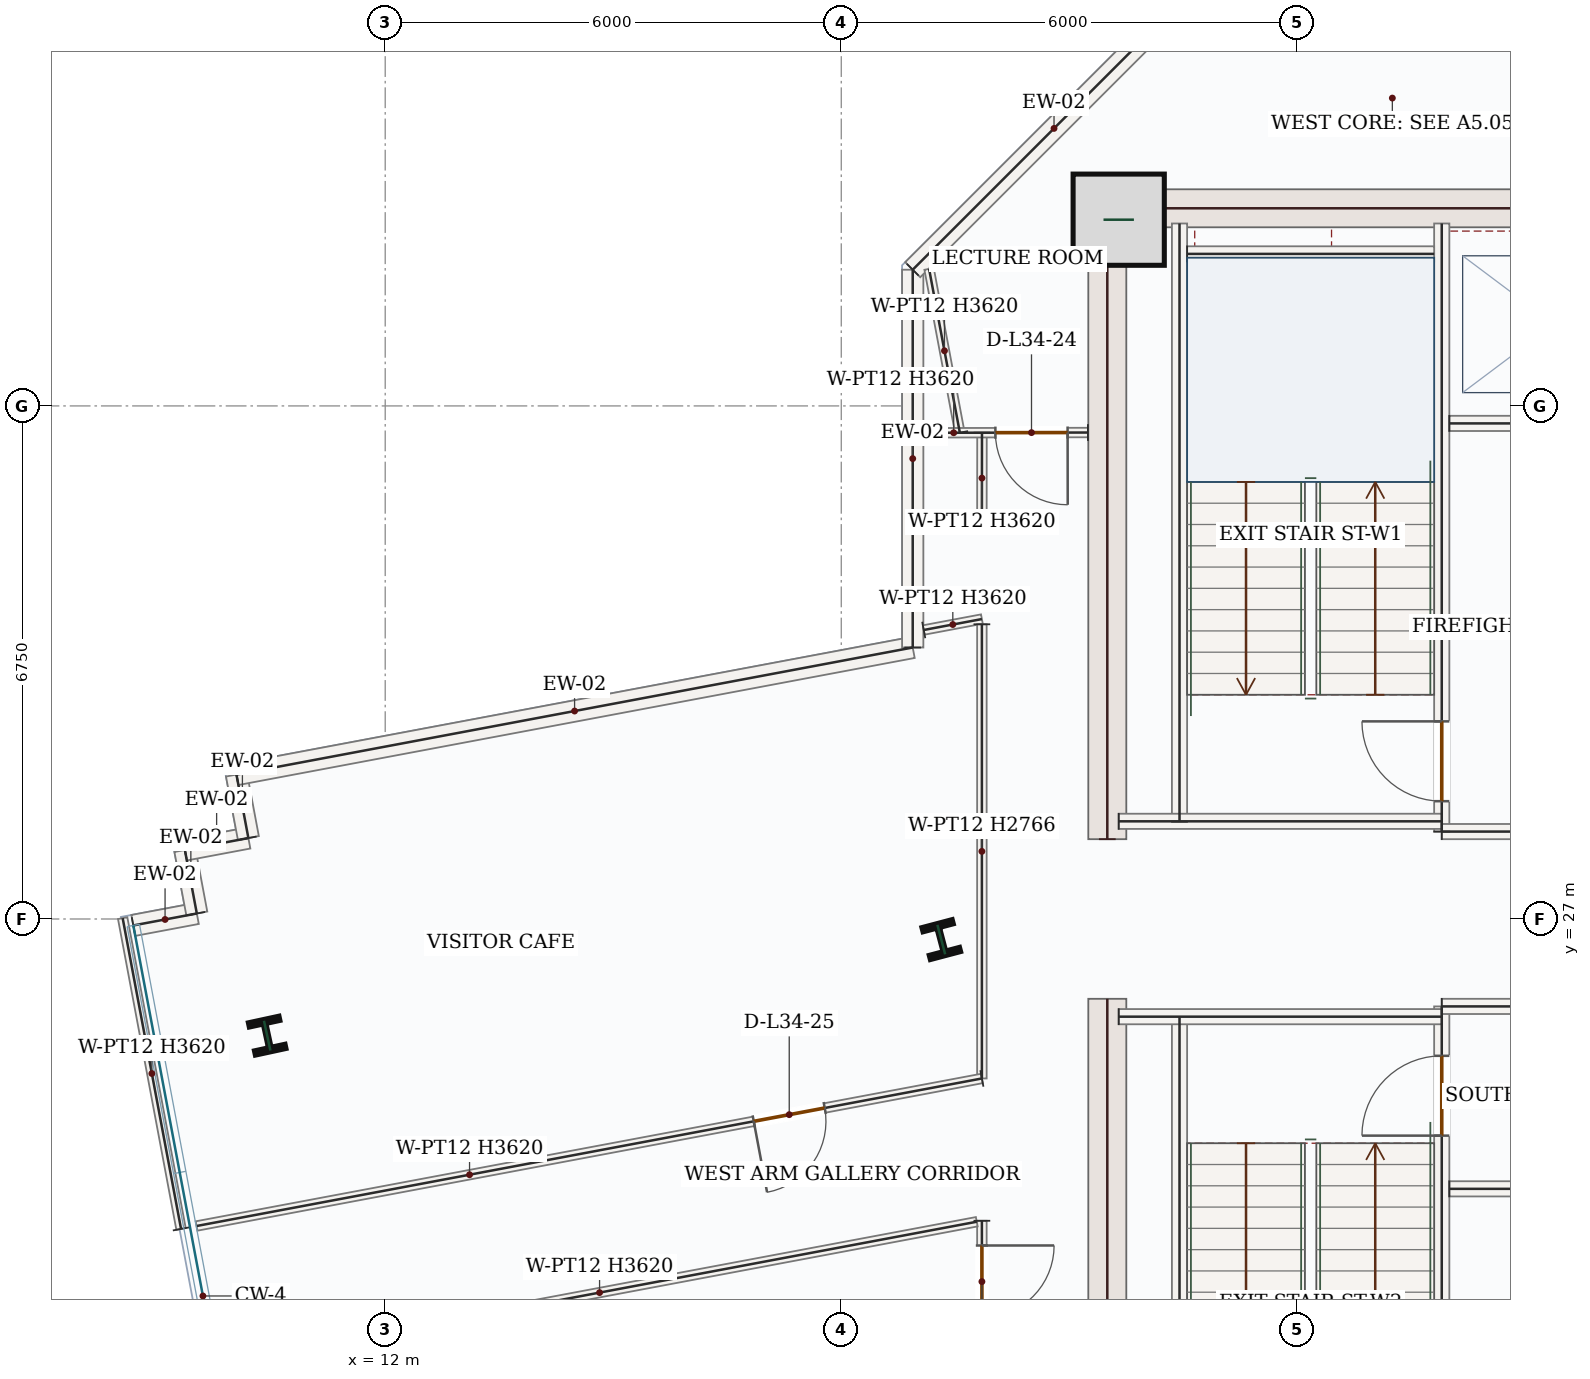
"""IFC4 building model, lengths in metres.
Left out: names, types, materials, properties, quantities, classifications, styles, units other than length and angle.
Written with IfcOpenShell. Run it as: python <this file> out.ifc"""

import sys

from ifc_helpers import new_model, si_unit, direction, frame, frame_2d, origin, origin_2d, place, context, subcontext, project, spatial, rectangle, i_section, extrude, source, transform, mapped, element, fill, save


model = new_model("IFC4")
c1 = context("Model", 3, precision=1e-05, world=origin(), true_north=direction((0.0, 1.0)))
c2 = subcontext(c1, "Body", "Model", "MODEL_VIEW")
j1 = project(units=[si_unit("LENGTHUNIT", "METRE"), si_unit("PLANEANGLEUNIT", "RADIAN")], contexts=[c1])
p1 = place(None, origin())
s1 = spatial("IfcSite", under=j1, at=p1, CompositionType="ELEMENT")
p2 = place(p1, origin())
s2 = spatial("IfcBuilding", under=s1, at=p2, CompositionType="ELEMENT")
p3 = place(p2, frame((0.0, 0.0, 151.2)))
s3 = spatial("IfcBuildingStorey", under=s2, at=p3, CompositionType="ELEMENT", Elevation=151.2)
m1 = source(origin(), c2, "Body", "SweptSolid", [
    extrude(rectangle(XDim=8.55, YDim=0.5, at=frame_2d((4.275, 0.0))), origin(), (0.0, 0.0, 1.0), 3.62),
])
for number, where, z_axis, x_axis in (
    (1, (21.5, 17.4, 0.0), (0.0, 0.0, 1.0), (0.0, 1.0, 0.0)),
    (2, (21.5, 28.05, 0.0), (0.0, 0.0, 1.0), (0.0, 1.0, 0.0)),
):
    element("IfcWall", number, at=place(p3, frame(where, z_axis=z_axis, x_axis=x_axis)), inside=s3, PredefinedType="SHEAR", context=c2, shape_type="MappedRepresentation", body=[
        mapped(m1, transform((0.0, 0.0, 0.0), x_axis=(1.0, 0.0, 0.0), y_axis=(0.0, 1.0, 0.0), z_axis=(0.0, 0.0, 1.0), scale=1.0)),
    ])
m2 = source(origin(), c2, "Body", "SweptSolid", [
    extrude(rectangle(XDim=7.0, YDim=0.5, at=frame_2d((3.5, 0.0))), origin(), (0.0, 0.0, 1.0), 3.62),
])
p4 = place(p3, frame((21.75, 36.35, 0.0), z_axis=(0.0, 0.0, 1.0), x_axis=(1.0, 0.0, 0.0)))
e3 = element("IfcWall", 3, at=p4, inside=s3, PredefinedType="SHEAR", context=c2, shape_type="MappedRepresentation", body=[
    mapped(m2, transform((0.0, 0.0, 0.0), x_axis=(1.0, 0.0, 0.0), y_axis=(0.0, 1.0, 0.0), z_axis=(0.0, 0.0, 1.0), scale=1.0)),
])
m3 = source(origin(), c2, "Body", "SweptSolid", [
    extrude(rectangle(XDim=1.2, YDim=1.2, at=origin_2d()), origin(), (0.0, 0.0, 1.0), 3.9),
])
p5 = place(p3, frame((21.65, 36.2, 0.0), z_axis=(0.0, 0.0, 1.0), x_axis=(1.0, 0.0, 0.0)))
e4 = element("IfcColumn", 4, at=p5, inside=s3, PredefinedType="COLUMN", context=c2, shape_type="MappedRepresentation", body=[
    mapped(m3, transform((0.0, 0.0, 0.0), x_axis=(1.0, 0.0, 0.0), y_axis=(0.0, 1.0, 0.0), z_axis=(0.0, 0.0, 1.0), scale=1.0)),
])
m4 = source(origin(), c2, "Body", "SweptSolid", [
    extrude(i_section(OverallWidth=0.412, OverallDepth=0.435, WebThickness=0.036, FlangeThickness=0.057, FilletRadius=0.018, at=origin_2d()), origin(), (0.0, 0.0, 1.0), 3.9),
])
for number, where, z_axis, x_axis in (
    (5, (19.316, 26.729, 0.0), (0.0, 0.0, 1.0), (0.967, 0.255, 0.0)),
    (6, (10.447, 25.465, 0.0), (0.0, 0.0, 1.0), (0.977, 0.211, 0.0)),
):
    element("IfcColumn", number, at=place(p3, frame(where, z_axis=z_axis, x_axis=x_axis)), inside=s3, PredefinedType="COLUMN", context=c2, shape_type="MappedRepresentation", body=[
        mapped(m4, transform((0.0, 0.0, 0.0), x_axis=(1.0, 0.0, 0.0), y_axis=(0.0, 1.0, 0.0), z_axis=(0.0, 0.0, 1.0), scale=1.0)),
    ])
m5 = source(origin(), c2, "Body", "SweptSolid", [
    extrude(rectangle(XDim=0.85, YDim=0.28, at=frame_2d((0.425, 0.0))), origin(), (0.0, 0.0, 1.0), 3.62),
])
for number, where, z_axis, x_axis in (
    (7, (8.686, 26.915, 0.0), (0.0, 0.0, 1.0), (0.983, 0.185, 0.0)),
    (8, (9.521, 27.072, 0.0), (0.0, 0.0, 1.0), (-0.185, 0.983, 0.0)),
):
    element("IfcWall", number, at=place(p3, frame(where, z_axis=z_axis, x_axis=x_axis)), inside=s3, PredefinedType="SOLIDWALL", context=c2, shape_type="MappedRepresentation", body=[
        mapped(m5, transform((0.0, 0.0, 0.0), x_axis=(1.0, 0.0, 0.0), y_axis=(0.0, 1.0, 0.0), z_axis=(0.0, 0.0, 1.0), scale=1.0)),
    ])
m6 = source(origin(), c2, "Body", "SweptSolid", [
    extrude(rectangle(XDim=0.85, YDim=0.28, at=frame_2d((0.425, 0.0))), origin(), (0.0, 0.0, 1.0), 3.62),
])
p6 = place(p3, frame((9.365, 27.908, 0.0), z_axis=(0.0, 0.0, 1.0), x_axis=(0.982790785128, 0.184722149909, 0.0)))
e9 = element("IfcWall", 9, at=p6, inside=s3, PredefinedType="SOLIDWALL", context=c2, shape_type="MappedRepresentation", body=[
    mapped(m6, transform((0.0, 0.0, 0.0), x_axis=(1.0, 0.0, 0.0), y_axis=(0.0, 1.0, 0.0), z_axis=(0.0, 0.0, 1.0), scale=1.0)),
])
p7 = place(p3, frame((10.2, 28.065, 0.0), z_axis=(0.0, 0.0, 1.0), x_axis=(-0.184392582027, 0.982852672425, 0.0)))
e10 = element("IfcWall", 10, at=p7, inside=s3, PredefinedType="SOLIDWALL", context=c2, shape_type="MappedRepresentation", body=[
    mapped(m5, transform((0.0, 0.0, 0.0), x_axis=(1.0, 0.0, 0.0), y_axis=(0.0, 1.0, 0.0), z_axis=(0.0, 0.0, 1.0), scale=1.0)),
])
m7 = source(origin(), c2, "Body", "SweptSolid", [
    extrude(rectangle(XDim=9.052, YDim=0.28, at=frame_2d((4.526, 0.0))), origin(), (0.0, 0.0, 1.0), 3.62),
])
p8 = place(p3, frame((10.043, 28.9, 0.0), z_axis=(0.0, 0.0, 1.0), x_axis=(0.982808012228, 0.184630471755, 0.0)))
e11 = element("IfcWall", 11, at=p8, inside=s3, PredefinedType="SOLIDWALL", context=c2, shape_type="MappedRepresentation", body=[
    mapped(m7, transform((0.0, 0.0, 0.0), x_axis=(1.0, 0.0, 0.0), y_axis=(0.0, 1.0, 0.0), z_axis=(0.0, 0.0, 1.0), scale=1.0)),
])
m8 = source(origin(), c2, "Body", "SweptSolid", [
    extrude(rectangle(XDim=4.97, YDim=0.28, at=frame_2d((2.485, 0.0))), origin(), (0.0, 0.0, 1.0), 3.62),
])
p9 = place(p3, frame((18.94, 30.572, 0.0), z_axis=(0.0, 0.0, 1.0), x_axis=(0.0, 1.0, 0.0)))
e12 = element("IfcWall", 12, at=p9, inside=s3, PredefinedType="SOLIDWALL", context=c2, shape_type="MappedRepresentation", body=[
    mapped(m8, transform((0.0, 0.0, 0.0), x_axis=(1.0, 0.0, 0.0), y_axis=(0.0, 1.0, 0.0), z_axis=(0.0, 0.0, 1.0), scale=1.0)),
])
m9 = source(origin(), c2, "Body", "SweptSolid", [
    extrude(rectangle(XDim=5.258, YDim=0.28, at=frame_2d((2.629, 0.0))), origin(), (0.0, 0.0, 1.0), 3.62),
])
p10 = place(p3, frame((18.94, 35.542, 0.0), z_axis=(0.0, 0.0, 1.0), x_axis=(0.707106781187, 0.707106781187, 0.0)))
e13 = element("IfcWall", 13, at=p10, inside=s3, PredefinedType="SOLIDWALL", context=c2, shape_type="MappedRepresentation", body=[
    mapped(m9, transform((0.0, 0.0, 0.0), x_axis=(1.0, 0.0, 0.0), y_axis=(0.0, 1.0, 0.0), z_axis=(0.0, 0.0, 1.0), scale=1.0)),
])
m10 = source(origin(), c2, "Body", "SweptSolid", [
    extrude(rectangle(XDim=7.87, YDim=0.2, at=frame_2d((3.935, 0.0))), origin(), (0.0, 0.0, 1.0), 3.62),
])
for number, where, z_axis, x_axis in (
    (14, (22.45, 17.85, 0.0), (0.0, 0.0, 1.0), (0.0, 1.0, 0.0)),
    (15, (22.45, 28.28, 0.0), (0.0, 0.0, 1.0), (0.0, 1.0, 0.0)),
):
    element("IfcWall", number, at=place(p3, frame(where, z_axis=z_axis, x_axis=x_axis)), inside=s3, PredefinedType="SOLIDWALL", context=c2, shape_type="MappedRepresentation", body=[
        mapped(m10, transform((0.0, 0.0, 0.0), x_axis=(1.0, 0.0, 0.0), y_axis=(0.0, 1.0, 0.0), z_axis=(0.0, 0.0, 1.0), scale=1.0)),
    ])
p11 = place(p3, frame((25.9, 17.85, 0.0), z_axis=(0.0, 0.0, 1.0), x_axis=(0.0, 1.0, 0.0)))
e16 = element("IfcWall", 16, at=p11, inside=s3, PredefinedType="SOLIDWALL", context=c2, shape_type="SweptSolid", body=[
    extrude(rectangle(XDim=8.0, YDim=0.2, at=frame_2d((4.0, 0.0))), origin(), (0.0, 0.0, 1.0), 3.62),
])
p12 = place(p11, frame((6.3, 0.0, 0.0)))
e17 = element("IfcOpeningElement", 17, at=p12, cuts=e16, PredefinedType="OPENING", context=c2, shape_type="SweptSolid", body=[
    extrude(rectangle(XDim=1.05, YDim=2.15, at=frame_2d((0.525, 1.075))), frame((0.0, 0.11, 0.0), z_axis=(0.0, -1.0, 0.0), x_axis=(1.0, 0.0, 0.0)), (0.0, 0.0, 1.0), 0.22),
])
p13 = place(p3, frame((25.9, 28.15, 0.0), z_axis=(0.0, 0.0, 1.0), x_axis=(0.0, 1.0, 0.0)))
e18 = element("IfcWall", 18, at=p13, inside=s3, PredefinedType="SOLIDWALL", context=c2, shape_type="SweptSolid", body=[
    extrude(rectangle(XDim=8.0, YDim=0.2, at=frame_2d((4.0, 0.0))), origin(), (0.0, 0.0, 1.0), 3.62),
])
p14 = place(p13, frame((0.4, 0.0, 0.0)))
e19 = element("IfcOpeningElement", 19, at=p14, cuts=e18, PredefinedType="OPENING", context=c2, shape_type="SweptSolid", body=[
    extrude(rectangle(XDim=1.05, YDim=2.15, at=frame_2d((0.525, 1.075))), frame((0.0, 0.11, 0.0), z_axis=(0.0, -1.0, 0.0), x_axis=(1.0, 0.0, 0.0)), (0.0, 0.0, 1.0), 0.22),
])
m11 = source(origin(), c2, "Body", "SweptSolid", [
    extrude(rectangle(XDim=4.25, YDim=0.2, at=frame_2d((2.125, 0.0))), origin(), (0.0, 0.0, 1.0), 3.62),
])
p15 = place(p3, frame((21.65, 25.715, 0.0), z_axis=(0.0, 0.0, 1.0), x_axis=(1.0, 0.0, 0.0)))
e20 = element("IfcWall", 20, at=p15, inside=s3, PredefinedType="SOLIDWALL", context=c2, shape_type="MappedRepresentation", body=[
    mapped(m11, transform((0.0, 0.0, 0.0), x_axis=(1.0, 0.0, 0.0), y_axis=(0.0, 1.0, 0.0), z_axis=(0.0, 0.0, 1.0), scale=1.0)),
])
m12 = source(origin(), c2, "Body", "SweptSolid", [
    extrude(rectangle(XDim=3.0, YDim=0.2, at=frame_2d((1.5, 0.0))), origin(), (0.0, 0.0, 1.0), 3.62),
])
p16 = place(p3, frame((25.9, 25.85, 0.0), z_axis=(0.0, 0.0, 1.0), x_axis=(1.0, 0.0, 0.0)))
e21 = element("IfcWall", 21, at=p16, inside=s3, PredefinedType="SOLIDWALL", context=c2, shape_type="MappedRepresentation", body=[
    mapped(m12, transform((0.0, 0.0, 0.0), x_axis=(1.0, 0.0, 0.0), y_axis=(0.0, 1.0, 0.0), z_axis=(0.0, 0.0, 1.0), scale=1.0)),
])
p17 = place(p3, frame((21.65, 28.285, 0.0), z_axis=(0.0, 0.0, 1.0), x_axis=(1.0, 0.0, 0.0)))
e22 = element("IfcWall", 22, at=p17, inside=s3, PredefinedType="SOLIDWALL", context=c2, shape_type="MappedRepresentation", body=[
    mapped(m11, transform((0.0, 0.0, 0.0), x_axis=(1.0, 0.0, 0.0), y_axis=(0.0, 1.0, 0.0), z_axis=(0.0, 0.0, 1.0), scale=1.0)),
])
p18 = place(p3, frame((25.9, 28.15, 0.0), z_axis=(0.0, 0.0, 1.0), x_axis=(1.0, 0.0, 0.0)))
e23 = element("IfcWall", 23, at=p18, inside=s3, PredefinedType="SOLIDWALL", context=c2, shape_type="MappedRepresentation", body=[
    mapped(m12, transform((0.0, 0.0, 0.0), x_axis=(1.0, 0.0, 0.0), y_axis=(0.0, 1.0, 0.0), z_axis=(0.0, 0.0, 1.0), scale=1.0)),
])
m13 = source(origin(), c2, "Body", "SweptSolid", [
    extrude(rectangle(XDim=3.25, YDim=0.2, at=frame_2d((1.625, 0.0))), origin(), (0.0, 0.0, 1.0), 3.62),
])
p19 = place(p3, frame((22.55, 35.75, 0.0), z_axis=(0.0, 0.0, 1.0), x_axis=(1.0, 0.0, 0.0)))
e24 = element("IfcWall", 24, at=p19, inside=s3, PredefinedType="SOLIDWALL", context=c2, shape_type="MappedRepresentation", body=[
    mapped(m13, transform((0.0, 0.0, 0.0), x_axis=(1.0, 0.0, 0.0), y_axis=(0.0, 1.0, 0.0), z_axis=(0.0, 0.0, 1.0), scale=1.0)),
])
p20 = place(p3, frame((26.0, 33.52, 0.0), z_axis=(0.0, 0.0, 1.0), x_axis=(1.0, 0.0, 0.0)))
e25 = element("IfcWall", 25, at=p20, inside=s3, PredefinedType="SOLIDWALL", context=c2, shape_type="SweptSolid", body=[
    extrude(rectangle(XDim=2.75, YDim=0.2, at=frame_2d((1.375, 0.0))), origin(), (0.0, 0.0, 1.0), 3.62),
])
p21 = place(p20, frame((0.82, 0.0, 0.0)))
e26 = element("IfcOpeningElement", 26, at=p21, cuts=e25, PredefinedType="OPENING", context=c2, shape_type="SweptSolid", body=[
    extrude(rectangle(XDim=1.1, YDim=2.15, at=frame_2d((0.55, 1.075))), frame((0.0, 0.11, 0.0), z_axis=(0.0, -1.0, 0.0), x_axis=(1.0, 0.0, 0.0)), (0.0, 0.0, 1.0), 0.22),
])
m14 = source(origin(), c2, "Body", "SweptSolid", [
    extrude(rectangle(XDim=2.75, YDim=0.2, at=frame_2d((1.375, 0.0))), origin(), (0.0, 0.0, 1.0), 3.62),
])
p22 = place(p3, frame((26.0, 23.45, 0.0), z_axis=(0.0, 0.0, 1.0), x_axis=(1.0, 0.0, 0.0)))
e27 = element("IfcWall", 27, at=p22, inside=s3, PredefinedType="SOLIDWALL", context=c2, shape_type="MappedRepresentation", body=[
    mapped(m14, transform((0.0, 0.0, 0.0), x_axis=(1.0, 0.0, 0.0), y_axis=(0.0, 1.0, 0.0), z_axis=(0.0, 0.0, 1.0), scale=1.0)),
])
m15 = source(origin(), c2, "Body", "SweptSolid", [
    extrude(rectangle(XDim=1.195, YDim=0.125, at=frame_2d((0.597, 0.0))), origin(), (0.0, 0.0, 1.0), 3.62),
])
p23 = place(p3, frame((19.851, 33.398, 0.0), z_axis=(0.0, 0.0, 1.0), x_axis=(-0.001021867441, -0.999999477893, 0.0)))
e28 = element("IfcWall", 28, at=p23, inside=s3, PredefinedType="PARTITIONING", context=c2, shape_type="MappedRepresentation", body=[
    mapped(m15, transform((0.0, 0.0, 0.0), x_axis=(1.0, 0.0, 0.0), y_axis=(0.0, 1.0, 0.0), z_axis=(0.0, 0.0, 1.0), scale=1.0)),
])
m16 = source(origin(), c2, "Body", "SweptSolid", [
    extrude(rectangle(XDim=2.192, YDim=0.125, at=frame_2d((1.096, 0.0))), origin(), (0.0, 0.0, 1.0), 3.62),
])
p24 = place(p3, frame((19.56, 33.398, 0.0), z_axis=(0.0, 0.0, 1.0), x_axis=(-0.184665106031, 0.982801505196, 0.0)))
e29 = element("IfcWall", 29, at=p24, inside=s3, PredefinedType="PARTITIONING", context=c2, shape_type="MappedRepresentation", body=[
    mapped(m16, transform((0.0, 0.0, 0.0), x_axis=(1.0, 0.0, 0.0), y_axis=(0.0, 1.0, 0.0), z_axis=(0.0, 0.0, 1.0), scale=1.0)),
])
p25 = place(p3, frame((21.245, 33.4, 0.0), z_axis=(0.0, 0.0, 1.0), x_axis=(-0.99999875384, -0.001578708001, 0.0)))
e30 = element("IfcWall", 30, at=p25, inside=s3, PredefinedType="PARTITIONING", context=c2, shape_type="SweptSolid", body=[
    extrude(rectangle(XDim=2.165, YDim=0.125, at=frame_2d((1.083, 0.0))), origin(), (0.0, 0.0, 1.0), 3.62),
])
p26 = place(p25, frame((0.267, 0.0, 0.0)))
e31 = element("IfcOpeningElement", 31, at=p26, cuts=e30, PredefinedType="OPENING", context=c2, shape_type="SweptSolid", body=[
    extrude(rectangle(XDim=0.95, YDim=2.15, at=frame_2d((0.475, 1.075))), frame((0.0, 0.073, 0.0), z_axis=(0.0, -1.0, 0.0), x_axis=(1.0, 0.0, 0.0)), (0.0, 0.0, 1.0), 0.145),
])
m17 = source(origin(), c2, "Body", "SweptSolid", [
    extrude(rectangle(XDim=4.16, YDim=0.125, at=frame_2d((2.08, 0.0))), origin(), (0.0, 0.0, 1.0), 3.62),
])
p27 = place(p3, frame((9.314, 22.923, 0.0), z_axis=(0.0, 0.0, 1.0), x_axis=(-0.184635785614, 0.982807013951, 0.0)))
e32 = element("IfcWall", 32, at=p27, inside=s3, PredefinedType="PARTITIONING", context=c2, shape_type="MappedRepresentation", body=[
    mapped(m17, transform((0.0, 0.0, 0.0), x_axis=(1.0, 0.0, 0.0), y_axis=(0.0, 1.0, 0.0), z_axis=(0.0, 0.0, 1.0), scale=1.0)),
])
m18 = source(origin(), c2, "Body", "SweptSolid", [
    extrude(rectangle(XDim=0.779, YDim=0.125, at=frame_2d((0.389, 0.0))), origin(), (0.0, 0.0, 1.0), 3.62),
])
p28 = place(p3, frame((19.085, 30.802, 0.0), z_axis=(0.0, 0.0, 1.0), x_axis=(0.982850878619, 0.184402143149, 0.0)))
e33 = element("IfcWall", 33, at=p28, inside=s3, PredefinedType="PARTITIONING", context=c2, shape_type="MappedRepresentation", body=[
    mapped(m18, transform((0.0, 0.0, 0.0), x_axis=(1.0, 0.0, 0.0), y_axis=(0.0, 1.0, 0.0), z_axis=(0.0, 0.0, 1.0), scale=1.0)),
])
m19 = source(origin(), c2, "Body", "SweptSolid", [
    extrude(rectangle(XDim=5.975, YDim=0.125, at=frame_2d((2.988, 0.0))), origin(), (0.0, 0.0, 1.0), 2.766),
])
p29 = place(p3, frame((19.85, 30.877, 0.0), z_axis=(0.0, 0.0, 1.0), x_axis=(0.0, -1.0, 0.0)))
e34 = element("IfcWall", 34, at=p29, inside=s3, PredefinedType="PARTITIONING", context=c2, shape_type="MappedRepresentation", body=[
    mapped(m19, transform((0.0, 0.0, 0.0), x_axis=(1.0, 0.0, 0.0), y_axis=(0.0, 1.0, 0.0), z_axis=(0.0, 0.0, 1.0), scale=1.0)),
])
p30 = place(p3, frame((19.85, 24.902, 0.0), z_axis=(0.0, 0.0, 1.0), x_axis=(-0.982804817995, -0.184647474194, 0.0)))
e35 = element("IfcWall", 35, at=p30, inside=s3, PredefinedType="PARTITIONING", context=c2, shape_type="SweptSolid", body=[
    extrude(rectangle(XDim=10.513, YDim=0.125, at=frame_2d((5.256, 0.0))), origin(), (0.0, 0.0, 1.0), 3.62),
])
p31 = place(p30, frame((2.104, 0.0, 0.0)))
e36 = element("IfcOpeningElement", 36, at=p31, cuts=e35, PredefinedType="OPENING", context=c2, shape_type="SweptSolid", body=[
    extrude(rectangle(XDim=0.95, YDim=2.15, at=frame_2d((0.475, 1.075))), frame((0.0, 0.073, 0.0), z_axis=(0.0, -1.0, 0.0), x_axis=(1.0, 0.0, 0.0)), (0.0, 0.0, 1.0), 0.145),
])
p32 = place(p3, frame((19.85, 23.03, 0.0), z_axis=(0.0, 0.0, 1.0), x_axis=(0.00040209084, -0.999999919161, 0.0)))
e37 = element("IfcWall", 37, at=p32, inside=s3, PredefinedType="PARTITIONING", context=c2, shape_type="SweptSolid", body=[
    extrude(rectangle(XDim=2.429, YDim=0.125, at=frame_2d((1.214, 0.0))), origin(), (0.0, 0.0, 1.0), 3.149),
])
p33 = place(p32, frame((0.325, 0.0, 0.0)))
e38 = element("IfcOpeningElement", 38, at=p33, cuts=e37, PredefinedType="OPENING", context=c2, shape_type="SweptSolid", body=[
    extrude(rectangle(XDim=0.95, YDim=2.15, at=frame_2d((0.475, 1.075))), frame((0.0, 0.073, 0.0), z_axis=(0.0, -1.0, 0.0), x_axis=(1.0, 0.0, 0.0)), (0.0, 0.0, 1.0), 0.145),
])
m20 = source(origin(), c2, "Body", "SweptSolid", [
    extrude(rectangle(XDim=10.098, YDim=0.125, at=frame_2d((5.049, 0.0))), origin(), (0.0, 0.0, 1.0), 3.62),
])
p34 = place(p3, frame((9.858, 21.153, 0.0), z_axis=(0.0, 0.0, 1.0), x_axis=(0.982807535277, 0.1846330106, 0.0)))
e39 = element("IfcWall", 39, at=p34, inside=s3, PredefinedType="PARTITIONING", context=c2, shape_type="MappedRepresentation", body=[
    mapped(m20, transform((0.0, 0.0, 0.0), x_axis=(1.0, 0.0, 0.0), y_axis=(0.0, 1.0, 0.0), z_axis=(0.0, 0.0, 1.0), scale=1.0)),
])
m21 = source(origin(), c2, "Body", "SweptSolid", [
    extrude(rectangle(XDim=1.05, YDim=2.15, at=frame_2d((0.525, 1.075))), frame((0.0, 0.025, 0.0), z_axis=(0.0, -1.0, 0.0), x_axis=(1.0, 0.0, 0.0)), (0.0, 0.0, 1.0), 0.05),
])
p35 = place(p14, origin())
e40 = element("IfcDoor", 40, at=p35, inside=s3, OperationType="SINGLE_SWING_RIGHT", PredefinedType="DOOR", context=c2, shape_type="MappedRepresentation", body=[
    mapped(m21, transform((0.0, 0.0, 0.0), x_axis=(1.0, 0.0, 0.0), y_axis=(0.0, 1.0, 0.0), z_axis=(0.0, 0.0, 1.0), scale=1.0)),
])
fill(e19, e40)
p36 = place(p12, origin())
e41 = element("IfcDoor", 41, at=p36, inside=s3, OperationType="SINGLE_SWING_LEFT", PredefinedType="DOOR", context=c2, shape_type="MappedRepresentation", body=[
    mapped(m21, transform((0.0, 0.0, 0.0), x_axis=(1.0, 0.0, 0.0), y_axis=(0.0, 1.0, 0.0), z_axis=(0.0, 0.0, 1.0), scale=1.0)),
])
fill(e17, e41)
m22 = source(origin(), c2, "Body", "SweptSolid", [
    extrude(rectangle(XDim=0.95, YDim=2.15, at=frame_2d((0.475, 1.075))), frame((0.0, 0.025, 0.0), z_axis=(0.0, -1.0, 0.0), x_axis=(1.0, 0.0, 0.0)), (0.0, 0.0, 1.0), 0.05),
])
p37 = place(p26, origin())
e42 = element("IfcDoor", 42, at=p37, inside=s3, OperationType="SINGLE_SWING_LEFT", PredefinedType="DOOR", context=c2, shape_type="MappedRepresentation", body=[
    mapped(m22, transform((0.0, 0.0, 0.0), x_axis=(1.0, 0.0, 0.0), y_axis=(0.0, 1.0, 0.0), z_axis=(0.0, 0.0, 1.0), scale=1.0)),
])
fill(e31, e42)
p38 = place(p31, origin())
e43 = element("IfcDoor", 43, at=p38, inside=s3, OperationType="SINGLE_SWING_RIGHT", PredefinedType="DOOR", context=c2, shape_type="MappedRepresentation", body=[
    mapped(m22, transform((0.0, 0.0, 0.0), x_axis=(1.0, 0.0, 0.0), y_axis=(0.0, 1.0, 0.0), z_axis=(0.0, 0.0, 1.0), scale=1.0)),
])
fill(e36, e43)
p39 = place(p33, origin())
e44 = element("IfcDoor", 44, at=p39, inside=s3, OperationType="SINGLE_SWING_LEFT", PredefinedType="DOOR", context=c2, shape_type="MappedRepresentation", body=[
    mapped(m22, transform((0.0, 0.0, 0.0), x_axis=(1.0, 0.0, 0.0), y_axis=(0.0, 1.0, 0.0), z_axis=(0.0, 0.0, 1.0), scale=1.0)),
])
fill(e38, e44)
save(model, sys.argv[1])
